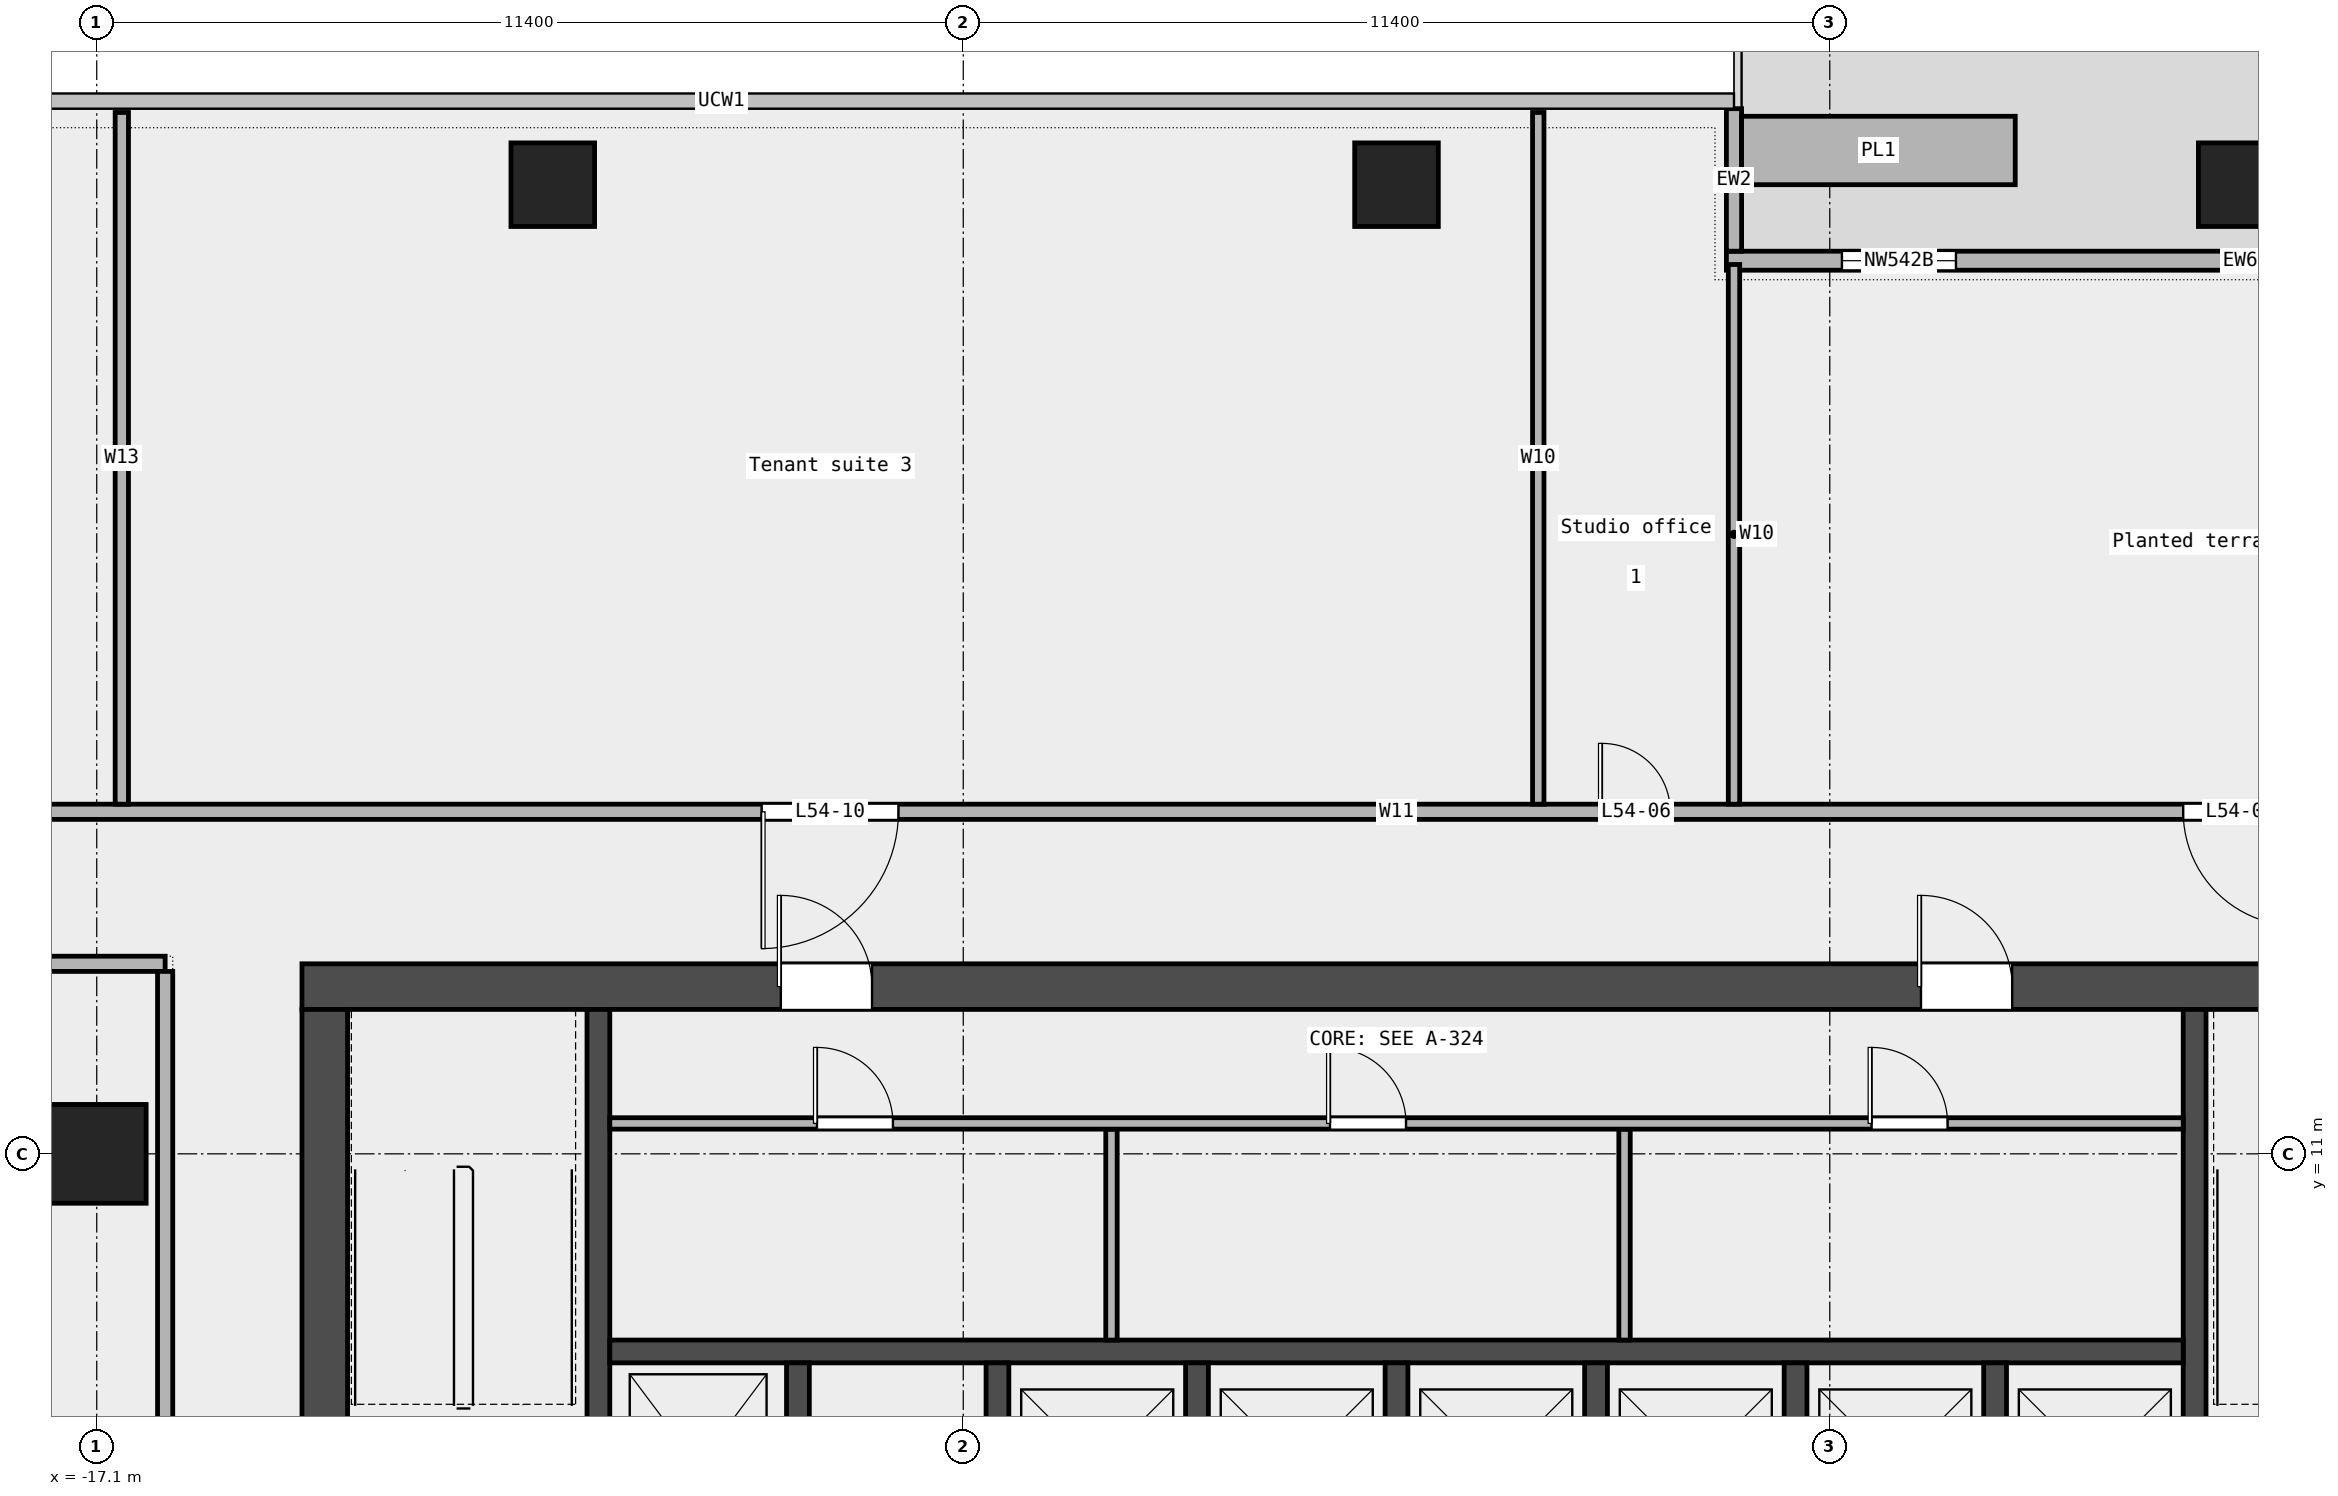
"""IFC4 building model, lengths in metres.
Left out: names, types, materials, properties, quantities, classifications, styles, units other than length and angle.
Written with IfcOpenShell. Run it as: python <this file> out.ifc"""

import sys

from ifc_helpers import new_model, si_unit, direction, frame, frame_2d, origin, origin_2d, place, context, subcontext, project, spatial, rectangle, extrude, element, fill, save


model = new_model("IFC4")
c1 = context("Model", 3, precision=1e-05, world=origin(), true_north=direction((0.0, 1.0)))
c2 = subcontext(c1, "Body", "Model", "MODEL_VIEW")
j1 = project(units=[si_unit("LENGTHUNIT", "METRE"), si_unit("PLANEANGLEUNIT", "RADIAN")], contexts=[c1])
p1 = place(None, origin())
s1 = spatial("IfcSite", under=j1, at=p1, CompositionType="ELEMENT")
p2 = place(p1, origin())
s2 = spatial("IfcBuilding", under=s1, at=p2, CompositionType="ELEMENT")
p3 = place(p2, frame((0.0, 0.0, 251.0)))
s3 = spatial("IfcBuildingStorey", under=s2, at=p3, CompositionType="ELEMENT", Elevation=251.0)
for number, where, z_axis, x_axis in (
    (1, (11.1, 23.75, 0.0), (0.0, 0.0, 1.0), (1.0, 0.0, 0.0)),
    (2, (0.0, 23.75, 0.0), (0.0, 0.0, 1.0), (1.0, 0.0, 0.0)),
    (3, (-11.1, 23.75, 0.0), (0.0, 0.0, 1.0), (1.0, 0.0, 0.0)),
):
    element("IfcColumn", number, at=place(p3, frame(where, z_axis=z_axis, x_axis=x_axis)), inside=s3, PredefinedType="COLUMN", context=c2, shape_type="SweptSolid", body=[
        extrude(rectangle(XDim=1.1, YDim=1.1, at=origin_2d()), origin(), (0.0, 0.0, 1.0), 3.6),
    ])
p4 = place(p3, frame((-17.1, 11.0, 0.0), z_axis=(0.0, 0.0, 1.0), x_axis=(1.0, 0.0, 0.0)))
e4 = element("IfcColumn", 4, at=p4, inside=s3, PredefinedType="COLUMN", context=c2, shape_type="SweptSolid", body=[
    extrude(rectangle(XDim=1.3, YDim=1.3, at=origin_2d()), origin(), (0.0, 0.0, 1.0), 3.6),
])
p5 = place(p3, frame((17.86, 22.75, 0.0), z_axis=(0.0, 0.0, 1.0), x_axis=(-1.0, 0.0, 0.0)))
e5 = element("IfcWall", 5, at=p5, inside=s3, PredefinedType="STANDARD", context=c2, shape_type="SweptSolid", body=[
    extrude(rectangle(XDim=13.52, YDim=0.25, at=frame_2d((6.76, 0.0))), origin(), (0.0, 0.0, 1.0), 3.6),
])
p6 = place(p5, frame((1.5, 0.0, 0.45)))
e6 = element("IfcOpeningElement", 6, at=p6, cuts=e5, PredefinedType="OPENING", context=c2, shape_type="SweptSolid", body=[
    extrude(rectangle(XDim=1.5, YDim=2.4, at=frame_2d((0.75, 1.2))), frame((0.0, 0.137, 0.0), z_axis=(0.0, -1.0, 0.0), x_axis=(1.0, 0.0, 0.0)), (0.0, 0.0, 1.0), 0.274),
])
p7 = place(p5, frame((4.0, 0.0, 0.0)))
e7 = element("IfcOpeningElement", 7, at=p7, cuts=e5, PredefinedType="OPENING", context=c2, shape_type="SweptSolid", body=[
    extrude(rectangle(XDim=1.8, YDim=2.4, at=frame_2d((0.9, 1.2))), frame((0.0, 0.137, 0.0), z_axis=(0.0, -1.0, 0.0), x_axis=(1.0, 0.0, 0.0)), (0.0, 0.0, 1.0), 0.274),
])
p8 = place(p5, frame((10.5, 0.0, 0.45)))
e8 = element("IfcOpeningElement", 8, at=p8, cuts=e5, PredefinedType="OPENING", context=c2, shape_type="SweptSolid", body=[
    extrude(rectangle(XDim=1.5, YDim=2.4, at=frame_2d((0.75, 1.2))), frame((0.0, 0.137, 0.0), z_axis=(0.0, -1.0, 0.0), x_axis=(1.0, 0.0, 0.0)), (0.0, 0.0, 1.0), 0.274),
])
p9 = place(p3, frame((4.44, 24.75, 0.0), z_axis=(0.0, 0.0, 1.0), x_axis=(0.0, -1.0, 0.0)))
e9 = element("IfcWall", 9, at=p9, inside=s3, PredefinedType="STANDARD", context=c2, shape_type="SweptSolid", body=[
    extrude(rectangle(XDim=1.875, YDim=0.2, at=frame_2d((0.938, 0.0))), origin(), (0.0, 0.0, 1.0), 3.6),
])
p10 = place(p3, frame((8.14, 24.2, 0.0), z_axis=(0.0, 0.0, 1.0), x_axis=(-1.0, 0.0, 0.0)))
e10 = element("IfcWall", 10, at=p10, inside=s3, PredefinedType="STANDARD", context=c2, shape_type="SweptSolid", body=[
    extrude(rectangle(XDim=3.6, YDim=0.9, at=frame_2d((1.8, 0.0))), origin(), (0.0, 0.0, 1.0), 0.7),
])
p11 = place(p3, frame((-26.15, 13.5, 0.0), z_axis=(0.0, 0.0, 1.0), x_axis=(1.0, 0.0, 0.0)))
e11 = element("IfcWall", 11, at=p11, inside=s3, PredefinedType="PARTITIONING", context=c2, shape_type="SweptSolid", body=[
    extrude(rectangle(XDim=9.95, YDim=0.2, at=frame_2d((4.975, 0.0))), origin(), (0.0, 0.0, 1.0), 3.6),
])
p12 = place(p3, frame((-28.15, 15.5, 0.0), z_axis=(0.0, 0.0, 1.0), x_axis=(1.0, 0.0, 0.0)))
e12 = element("IfcWall", 12, at=p12, inside=s3, PredefinedType="PARTITIONING", context=c2, shape_type="SweptSolid", body=[
    extrude(rectangle(XDim=56.3, YDim=0.2, at=frame_2d((28.15, 0.0))), origin(), (0.0, 0.0, 1.0), 3.6),
])
p13 = place(p12, frame((50.405, 0.0, 0.0)))
e13 = element("IfcOpeningElement", 13, at=p13, cuts=e12, PredefinedType="OPENING", context=c2, shape_type="SweptSolid", body=[
    extrude(rectangle(XDim=1.2, YDim=2.1, at=frame_2d((0.6, 1.05))), frame((0.0, 0.112, 0.0), z_axis=(0.0, -1.0, 0.0), x_axis=(1.0, 0.0, 0.0)), (0.0, 0.0, 1.0), 0.224),
])
p14 = place(p12, frame((38.5, 0.0, 0.0)))
e14 = element("IfcOpeningElement", 14, at=p14, cuts=e12, PredefinedType="OPENING", context=c2, shape_type="SweptSolid", body=[
    extrude(rectangle(XDim=1.5, YDim=2.1, at=frame_2d((0.75, 1.05))), frame((0.0, 0.112, 0.0), z_axis=(0.0, -1.0, 0.0), x_axis=(1.0, 0.0, 0.0)), (0.0, 0.0, 1.0), 0.224),
])
p15 = place(p12, frame((30.853, 0.0, 0.0)))
e15 = element("IfcOpeningElement", 15, at=p15, cuts=e12, PredefinedType="OPENING", context=c2, shape_type="SweptSolid", body=[
    extrude(rectangle(XDim=0.9, YDim=2.1, at=frame_2d((0.45, 1.05))), frame((0.0, 0.112, 0.0), z_axis=(0.0, -1.0, 0.0), x_axis=(1.0, 0.0, 0.0)), (0.0, 0.0, 1.0), 0.224),
])
p16 = place(p12, frame((19.798, 0.0, 0.0)))
e16 = element("IfcOpeningElement", 16, at=p16, cuts=e12, PredefinedType="OPENING", context=c2, shape_type="SweptSolid", body=[
    extrude(rectangle(XDim=1.8, YDim=2.1, at=frame_2d((0.9, 1.05))), frame((0.0, 0.112, 0.0), z_axis=(0.0, -1.0, 0.0), x_axis=(1.0, 0.0, 0.0)), (0.0, 0.0, 1.0), 0.224),
])
p17 = place(p12, frame((5.04, 0.0, 0.0)))
e17 = element("IfcOpeningElement", 17, at=p17, cuts=e12, PredefinedType="OPENING", context=c2, shape_type="SweptSolid", body=[
    extrude(rectangle(XDim=1.5, YDim=2.1, at=frame_2d((0.75, 1.05))), frame((0.0, 0.112, 0.0), z_axis=(0.0, -1.0, 0.0), x_axis=(1.0, 0.0, 0.0)), (0.0, 0.0, 1.0), 0.224),
])
p18 = place(p3, frame((-16.77, 15.6, 0.0), z_axis=(0.0, 0.0, 1.0), x_axis=(0.0, 1.0, 0.0)))
e18 = element("IfcWall", 18, at=p18, inside=s3, PredefinedType="PARTITIONING", context=c2, shape_type="SweptSolid", body=[
    extrude(rectangle(XDim=9.1, YDim=0.175, at=frame_2d((4.55, 0.0))), origin(), (0.0, 0.0, 1.0), 3.6),
])
p19 = place(p3, frame((-16.2, -7.1, 0.0), z_axis=(0.0, 0.0, 1.0), x_axis=(0.0, 1.0, 0.0)))
e19 = element("IfcWall", 19, at=p19, inside=s3, PredefinedType="PARTITIONING", context=c2, shape_type="SweptSolid", body=[
    extrude(rectangle(XDim=20.5, YDim=0.2, at=frame_2d((10.25, 0.0))), origin(), (0.0, 0.0, 1.0), 3.6),
])
p20 = place(p19, frame((13.05, 0.0, 0.0)))
e20 = element("IfcOpeningElement", 20, at=p20, cuts=e19, PredefinedType="OPENING", context=c2, shape_type="SweptSolid", body=[
    extrude(rectangle(XDim=1.5, YDim=2.1, at=frame_2d((0.75, 1.05))), frame((0.0, 0.112, 0.0), z_axis=(0.0, -1.0, 0.0), x_axis=(1.0, 0.0, 0.0)), (0.0, 0.0, 1.0), 0.224),
])
p21 = place(p3, frame((1.865, 15.6, 0.0), z_axis=(0.0, 0.0, 1.0), x_axis=(0.0, 1.0, 0.0)))
e21 = element("IfcWall", 21, at=p21, inside=s3, PredefinedType="PARTITIONING", context=c2, shape_type="SweptSolid", body=[
    extrude(rectangle(XDim=9.1, YDim=0.15, at=frame_2d((4.55, 0.0))), origin(), (0.0, 0.0, 1.0), 3.6),
])
p22 = place(p3, frame((4.44, 15.6, 0.0), z_axis=(0.0, 0.0, 1.0), x_axis=(0.0, 1.0, 0.0)))
e22 = element("IfcWall", 22, at=p22, inside=s3, PredefinedType="PARTITIONING", context=c2, shape_type="SweptSolid", body=[
    extrude(rectangle(XDim=7.1, YDim=0.15, at=frame_2d((3.55, 0.0))), origin(), (0.0, 0.0, 1.0), 3.6),
])
p23 = place(p3, frame((-14.4, 13.2, 0.0), z_axis=(0.0, 0.0, 1.0), x_axis=(1.0, 0.0, 0.0)))
e23 = element("IfcWall", 23, at=p23, inside=s3, PredefinedType="SHEAR", context=c2, shape_type="SweptSolid", body=[
    extrude(rectangle(XDim=28.8, YDim=0.6, at=frame_2d((14.4, 0.0))), origin(), (0.0, 0.0, 1.0), 3.7),
])
p24 = place(p23, frame((6.3, 0.0, 0.0)))
e24 = element("IfcOpeningElement", 24, at=p24, cuts=e23, PredefinedType="OPENING", context=c2, shape_type="SweptSolid", body=[
    extrude(rectangle(XDim=1.2, YDim=2.1, at=frame_2d((0.6, 1.05))), frame((0.0, 0.312, 0.0), z_axis=(0.0, -1.0, 0.0), x_axis=(1.0, 0.0, 0.0)), (0.0, 0.0, 1.0), 0.624),
])
p25 = place(p23, frame((21.3, 0.0, 0.0)))
e25 = element("IfcOpeningElement", 25, at=p25, cuts=e23, PredefinedType="OPENING", context=c2, shape_type="SweptSolid", body=[
    extrude(rectangle(XDim=1.2, YDim=2.1, at=frame_2d((0.6, 1.05))), frame((0.0, 0.312, 0.0), z_axis=(0.0, -1.0, 0.0), x_axis=(1.0, 0.0, 0.0)), (0.0, 0.0, 1.0), 0.624),
])
p26 = place(p3, frame((-14.1, -6.6, 0.0), z_axis=(0.0, 0.0, 1.0), x_axis=(0.0, 1.0, 0.0)))
e26 = element("IfcWall", 26, at=p26, inside=s3, PredefinedType="SHEAR", context=c2, shape_type="SweptSolid", body=[
    extrude(rectangle(XDim=19.5, YDim=0.6, at=frame_2d((9.75, 0.0))), origin(), (0.0, 0.0, 1.0), 3.7),
])
p27 = place(p26, frame((9.3, 0.0, 0.0)))
e27 = element("IfcOpeningElement", 27, at=p27, cuts=e26, PredefinedType="OPENING", context=c2, shape_type="SweptSolid", body=[
    extrude(rectangle(XDim=1.8, YDim=2.1, at=frame_2d((0.9, 1.05))), frame((0.0, 0.312, 0.0), z_axis=(0.0, -1.0, 0.0), x_axis=(1.0, 0.0, 0.0)), (0.0, 0.0, 1.0), 0.624),
])
for number, where, z_axis, x_axis in (
    (28, (-10.5, 5.25, 0.0), (0.0, 0.0, 1.0), (0.0, 1.0, 0.0)),
    (29, (10.5, 5.25, 0.0), (0.0, 0.0, 1.0), (0.0, 1.0, 0.0)),
):
    element("IfcWall", number, at=place(p3, frame(where, z_axis=z_axis, x_axis=x_axis)), inside=s3, PredefinedType="SHEAR", context=c2, shape_type="SweptSolid", body=[
        extrude(rectangle(XDim=7.65, YDim=0.3, at=frame_2d((3.825, 0.0))), origin(), (0.0, 0.0, 1.0), 3.7),
    ])
p28 = place(p3, frame((-10.35, 8.4, 0.0), z_axis=(0.0, 0.0, 1.0), x_axis=(1.0, 0.0, 0.0)))
e30 = element("IfcWall", 30, at=p28, inside=s3, PredefinedType="SOLIDWALL", context=c2, shape_type="SweptSolid", body=[
    extrude(rectangle(XDim=20.7, YDim=0.3, at=frame_2d((10.35, 0.0))), origin(), (0.0, 0.0, 1.0), 3.7),
])
for number, where, z_axis, x_axis in (
    (31, (-7.875, 5.55, 0.0), (0.0, 0.0, 1.0), (0.0, 1.0, 0.0)),
    (32, (-5.25, 5.55, 0.0), (0.0, 0.0, 1.0), (0.0, 1.0, 0.0)),
    (33, (-2.625, 5.55, 0.0), (0.0, 0.0, 1.0), (0.0, 1.0, 0.0)),
    (34, (0.0, 5.55, 0.0), (0.0, 0.0, 1.0), (0.0, 1.0, 0.0)),
    (35, (2.625, 5.55, 0.0), (0.0, 0.0, 1.0), (0.0, 1.0, 0.0)),
    (36, (5.25, 5.55, 0.0), (0.0, 0.0, 1.0), (0.0, 1.0, 0.0)),
    (37, (7.875, 5.55, 0.0), (0.0, 0.0, 1.0), (0.0, 1.0, 0.0)),
):
    element("IfcWall", number, at=place(p3, frame(where, z_axis=z_axis, x_axis=x_axis)), inside=s3, PredefinedType="SOLIDWALL", context=c2, shape_type="SweptSolid", body=[
        extrude(rectangle(XDim=2.7, YDim=0.3, at=frame_2d((1.35, 0.0))), origin(), (0.0, 0.0, 1.0), 3.7),
    ])
for number, where, z_axis, x_axis in (
    (38, (-3.75, 8.55, 0.0), (0.0, 0.0, 1.0), (0.0, 1.0, 0.0)),
    (39, (3.0, 8.55, 0.0), (0.0, 0.0, 1.0), (0.0, 1.0, 0.0)),
):
    element("IfcWall", number, at=place(p3, frame(where, z_axis=z_axis, x_axis=x_axis)), inside=s3, PredefinedType="PARTITIONING", context=c2, shape_type="SweptSolid", body=[
        extrude(rectangle(XDim=2.775, YDim=0.15, at=frame_2d((1.387, 0.0))), origin(), (0.0, 0.0, 1.0), 3.7),
    ])
p29 = place(p3, frame((-10.35, 11.4, 0.0), z_axis=(0.0, 0.0, 1.0), x_axis=(1.0, 0.0, 0.0)))
e40 = element("IfcWall", 40, at=p29, inside=s3, PredefinedType="PARTITIONING", context=c2, shape_type="SweptSolid", body=[
    extrude(rectangle(XDim=20.7, YDim=0.15, at=frame_2d((10.35, 0.0))), origin(), (0.0, 0.0, 1.0), 3.7),
])
p30 = place(p29, frame((2.725, 0.0, 0.0)))
e41 = element("IfcOpeningElement", 41, at=p30, cuts=e40, PredefinedType="OPENING", context=c2, shape_type="SweptSolid", body=[
    extrude(rectangle(XDim=1.0, YDim=2.1, at=frame_2d((0.5, 1.05))), frame((0.0, 0.087, 0.0), z_axis=(0.0, -1.0, 0.0), x_axis=(1.0, 0.0, 0.0)), (0.0, 0.0, 1.0), 0.174),
])
p31 = place(p29, frame((9.475, 0.0, 0.0)))
e42 = element("IfcOpeningElement", 42, at=p31, cuts=e40, PredefinedType="OPENING", context=c2, shape_type="SweptSolid", body=[
    extrude(rectangle(XDim=1.0, YDim=2.1, at=frame_2d((0.5, 1.05))), frame((0.0, 0.087, 0.0), z_axis=(0.0, -1.0, 0.0), x_axis=(1.0, 0.0, 0.0)), (0.0, 0.0, 1.0), 0.174),
])
p32 = place(p29, frame((16.6, 0.0, 0.0)))
e43 = element("IfcOpeningElement", 43, at=p32, cuts=e40, PredefinedType="OPENING", context=c2, shape_type="SweptSolid", body=[
    extrude(rectangle(XDim=1.0, YDim=2.1, at=frame_2d((0.5, 1.05))), frame((0.0, 0.087, 0.0), z_axis=(0.0, -1.0, 0.0), x_axis=(1.0, 0.0, 0.0)), (0.0, 0.0, 1.0), 0.174),
])
p33 = place(p8, origin())
e44 = element("IfcWindow", 44, at=p33, inside=s3, PartitioningType="SINGLE_PANEL", PredefinedType="WINDOW", context=c2, shape_type="SweptSolid", body=[
    extrude(rectangle(XDim=1.5, YDim=2.4, at=frame_2d((0.75, 1.2))), frame((0.0, 0.03, 0.0), z_axis=(0.0, -1.0, 0.0), x_axis=(1.0, 0.0, 0.0)), (0.0, 0.0, 1.0), 0.06),
])
fill(e8, e44)
p34 = place(p14, origin())
e45 = element("IfcDoor", 45, at=p34, inside=s3, OperationType="DOUBLE_DOOR_SINGLE_SWING", PredefinedType="DOOR", context=c2, shape_type="SweptSolid", body=[
    extrude(rectangle(XDim=1.5, YDim=2.1, at=frame_2d((0.75, 1.05))), frame((0.0, 0.025, 0.0), z_axis=(0.0, -1.0, 0.0), x_axis=(1.0, 0.0, 0.0)), (0.0, 0.0, 1.0), 0.05),
])
fill(e14, e45)
p35 = place(p15, origin())
e46 = element("IfcDoor", 46, at=p35, inside=s3, OperationType="SINGLE_SWING_LEFT", PredefinedType="DOOR", context=c2, shape_type="SweptSolid", body=[
    extrude(rectangle(XDim=0.9, YDim=2.1, at=frame_2d((0.45, 1.05))), frame((0.0, 0.025, 0.0), z_axis=(0.0, -1.0, 0.0), x_axis=(1.0, 0.0, 0.0)), (0.0, 0.0, 1.0), 0.05),
])
fill(e15, e46)
p36 = place(p16, origin())
e47 = element("IfcDoor", 47, at=p36, inside=s3, OperationType="DOUBLE_DOOR_SINGLE_SWING", PredefinedType="DOOR", context=c2, shape_type="SweptSolid", body=[
    extrude(rectangle(XDim=1.8, YDim=2.1, at=frame_2d((0.9, 1.05))), frame((0.0, 0.025, 0.0), z_axis=(0.0, -1.0, 0.0), x_axis=(1.0, 0.0, 0.0)), (0.0, 0.0, 1.0), 0.05),
])
fill(e16, e47)
p37 = place(p30, origin())
e48 = element("IfcDoor", 48, at=p37, inside=s3, OperationType="SINGLE_SWING_LEFT", PredefinedType="DOOR", context=c2, shape_type="SweptSolid", body=[
    extrude(rectangle(XDim=1.0, YDim=2.1, at=frame_2d((0.5, 1.05))), frame((0.0, 0.025, 0.0), z_axis=(0.0, -1.0, 0.0), x_axis=(1.0, 0.0, 0.0)), (0.0, 0.0, 1.0), 0.05),
])
fill(e41, e48)
p38 = place(p31, origin())
e49 = element("IfcDoor", 49, at=p38, inside=s3, OperationType="SINGLE_SWING_LEFT", PredefinedType="DOOR", context=c2, shape_type="SweptSolid", body=[
    extrude(rectangle(XDim=1.0, YDim=2.1, at=frame_2d((0.5, 1.05))), frame((0.0, 0.025, 0.0), z_axis=(0.0, -1.0, 0.0), x_axis=(1.0, 0.0, 0.0)), (0.0, 0.0, 1.0), 0.05),
])
fill(e42, e49)
p39 = place(p32, origin())
e50 = element("IfcDoor", 50, at=p39, inside=s3, OperationType="SINGLE_SWING_LEFT", PredefinedType="DOOR", context=c2, shape_type="SweptSolid", body=[
    extrude(rectangle(XDim=1.0, YDim=2.1, at=frame_2d((0.5, 1.05))), frame((0.0, 0.025, 0.0), z_axis=(0.0, -1.0, 0.0), x_axis=(1.0, 0.0, 0.0)), (0.0, 0.0, 1.0), 0.05),
])
fill(e43, e50)
p40 = place(p24, origin())
e51 = element("IfcDoor", 51, at=p40, inside=s3, OperationType="SINGLE_SWING_LEFT", PredefinedType="DOOR", context=c2, shape_type="SweptSolid", body=[
    extrude(rectangle(XDim=1.2, YDim=2.1, at=frame_2d((0.6, 1.05))), frame((0.0, 0.025, 0.0), z_axis=(0.0, -1.0, 0.0), x_axis=(1.0, 0.0, 0.0)), (0.0, 0.0, 1.0), 0.05),
])
fill(e24, e51)
p41 = place(p25, origin())
e52 = element("IfcDoor", 52, at=p41, inside=s3, OperationType="SINGLE_SWING_RIGHT", PredefinedType="DOOR", context=c2, shape_type="SweptSolid", body=[
    extrude(rectangle(XDim=1.2, YDim=2.1, at=frame_2d((0.6, 1.05))), frame((0.0, 0.025, 0.0), z_axis=(0.0, -1.0, 0.0), x_axis=(1.0, 0.0, 0.0)), (0.0, 0.0, 1.0), 0.05),
])
fill(e25, e52)
save(model, sys.argv[1])
